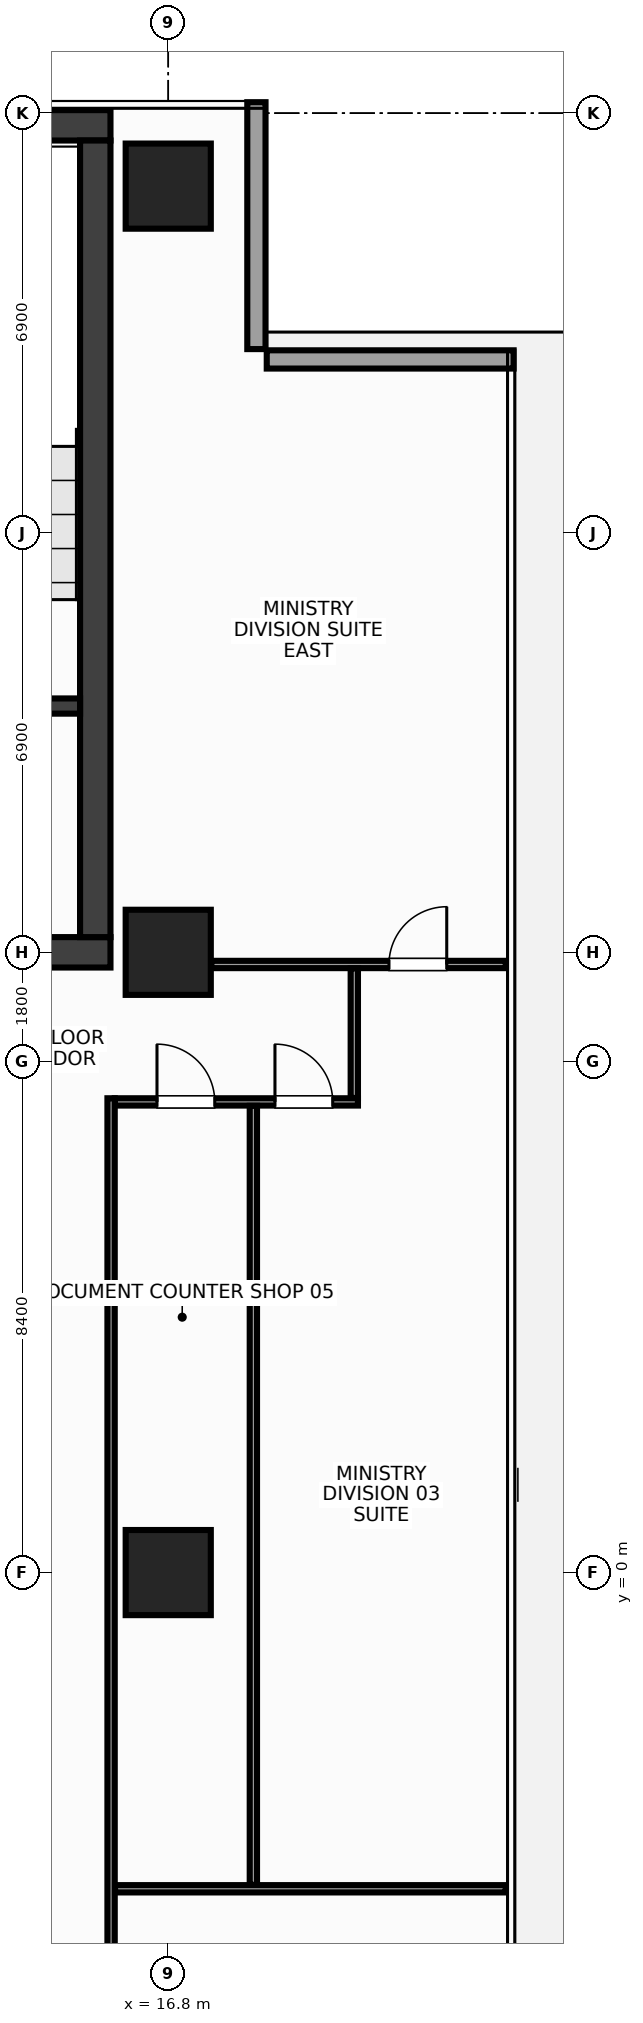
"""IFC4 building model, lengths in metres.
Left out: names, types, materials, properties, quantities, classifications, styles, units other than length and angle.
Written with IfcOpenShell. Run it as: python <this file> out.ifc"""

import sys

from ifc_helpers import new_model, si_unit, direction, frame, frame_2d, origin, origin_2d, place, context, subcontext, project, spatial, rectangle, extrude, source, transform, mapped, element, fill, save


model = new_model("IFC4")
c1 = context("Model", 3, precision=1e-05, world=origin(), true_north=direction((0.0, 1.0)))
c2 = subcontext(c1, "Body", "Model", "MODEL_VIEW")
j1 = project(units=[si_unit("LENGTHUNIT", "METRE"), si_unit("PLANEANGLEUNIT", "RADIAN")], contexts=[c1])
p1 = place(None, origin())
s1 = spatial("IfcSite", under=j1, at=p1, CompositionType="ELEMENT")
p2 = place(p1, origin())
s2 = spatial("IfcBuilding", under=s1, at=p2, CompositionType="ELEMENT")
p3 = place(p2, frame((0.0, 0.0, 228.8)))
s3 = spatial("IfcBuildingStorey", under=s2, at=p3, CompositionType="ELEMENT", Elevation=228.8)
m1 = source(origin(), c2, "Body", "SweptSolid", [
    extrude(rectangle(XDim=31.7, YDim=0.5, at=frame_2d((15.85, 0.0))), origin(), (0.0, 0.0, 1.0), 3.6),
])
p4 = place(p3, frame((-15.85, 23.8, 0.0), z_axis=(0.0, 0.0, 1.0), x_axis=(1.0, 0.0, 0.0)))
e1 = element("IfcWall", 1, at=p4, inside=s3, PredefinedType="SHEAR", context=c2, shape_type="MappedRepresentation", body=[
    mapped(m1, transform((0.0, 0.0, 0.0), x_axis=(1.0, 0.0, 0.0), y_axis=(0.0, 1.0, 0.0), z_axis=(0.0, 0.0, 1.0), scale=1.0)),
])
p5 = place(p3, frame((-15.85, 10.2, 0.0), z_axis=(0.0, 0.0, 1.0), x_axis=(1.0, 0.0, 0.0)))
e2 = element("IfcWall", 2, at=p5, inside=s3, PredefinedType="SHEAR", context=c2, shape_type="MappedRepresentation", body=[
    mapped(m1, transform((0.0, 0.0, 0.0), x_axis=(1.0, 0.0, 0.0), y_axis=(0.0, 1.0, 0.0), z_axis=(0.0, 0.0, 1.0), scale=1.0)),
])
p6 = place(p5, frame((1.7, 0.0, 0.0)))
e3 = element("IfcOpeningElement", 3, at=p6, cuts=e2, PredefinedType="OPENING", context=c2, shape_type="SweptSolid", body=[
    extrude(rectangle(XDim=1.6, YDim=2.15, at=frame_2d((0.8, 1.075))), frame((0.0, 0.262, 0.0), z_axis=(0.0, -1.0, 0.0), x_axis=(1.0, 0.0, 0.0)), (0.0, 0.0, 1.0), 0.524),
])
p7 = place(p5, frame((28.4, 0.0, 0.0)))
e4 = element("IfcOpeningElement", 4, at=p7, cuts=e2, PredefinedType="OPENING", context=c2, shape_type="SweptSolid", body=[
    extrude(rectangle(XDim=1.6, YDim=2.15, at=frame_2d((0.8, 1.075))), frame((0.0, 0.262, 0.0), z_axis=(0.0, -1.0, 0.0), x_axis=(1.0, 0.0, 0.0)), (0.0, 0.0, 1.0), 0.524),
])
p8 = place(p5, frame((15.1, 0.0, 0.0)))
e5 = element("IfcOpeningElement", 5, at=p8, cuts=e2, PredefinedType="OPENING", context=c2, shape_type="SweptSolid", body=[
    extrude(rectangle(XDim=1.5, YDim=2.2, at=frame_2d((0.75, 1.1))), frame((0.0, 0.262, 0.0), z_axis=(0.0, -1.0, 0.0), x_axis=(1.0, 0.0, 0.0)), (0.0, 0.0, 1.0), 0.524),
])
m2 = source(origin(), c2, "Body", "SweptSolid", [
    extrude(rectangle(XDim=13.1, YDim=0.5, at=frame_2d((6.55, 0.0))), origin(), (0.0, 0.0, 1.0), 3.6),
])
p9 = place(p3, frame((15.6, 10.45, 0.0), z_axis=(0.0, 0.0, 1.0), x_axis=(0.0, 1.0, 0.0)))
e6 = element("IfcWall", 6, at=p9, inside=s3, PredefinedType="SHEAR", context=c2, shape_type="MappedRepresentation", body=[
    mapped(m2, transform((0.0, 0.0, 0.0), x_axis=(1.0, 0.0, 0.0), y_axis=(0.0, 1.0, 0.0), z_axis=(0.0, 0.0, 1.0), scale=1.0)),
])
m3 = source(origin(), c2, "Body", "SweptSolid", [
    extrude(rectangle(XDim=3.705, YDim=0.25, at=frame_2d((1.853, 0.0))), origin(), (0.0, 0.0, 1.0), 3.6),
])
p10 = place(p3, frame((11.645, 14.25, 0.0), z_axis=(0.0, 0.0, 1.0), x_axis=(1.0, 0.0, 0.0)))
e7 = element("IfcWall", 7, at=p10, inside=s3, PredefinedType="SHEAR", context=c2, shape_type="MappedRepresentation", body=[
    mapped(m3, transform((0.0, 0.0, 0.0), x_axis=(1.0, 0.0, 0.0), y_axis=(0.0, 1.0, 0.0), z_axis=(0.0, 0.0, 1.0), scale=1.0)),
])
p11 = place(p10, frame((0.95, 0.0, 0.0)))
e8 = element("IfcOpeningElement", 8, at=p11, cuts=e7, PredefinedType="OPENING", context=c2, shape_type="SweptSolid", body=[
    extrude(rectangle(XDim=1.6, YDim=2.15, at=frame_2d((0.8, 1.075))), frame((0.0, 0.137, 0.0), z_axis=(0.0, -1.0, 0.0), x_axis=(1.0, 0.0, 0.0)), (0.0, 0.0, 1.0), 0.274),
])
m4 = source(origin(), c2, "Body", "SweptSolid", [
    extrude(rectangle(XDim=1.4, YDim=1.4, at=origin_2d()), origin(), (0.0, 0.0, 1.0), 3.6),
])
for number, where, z_axis, x_axis in (
    (9, (16.8, 0.0, 0.0), (0.0, 0.0, 1.0), (1.0, 0.0, 0.0)),
    (10, (16.8, 10.2, 0.0), (0.0, 0.0, 1.0), (1.0, 0.0, 0.0)),
    (11, (16.8, 22.8, 0.0), (0.0, 0.0, 1.0), (1.0, 0.0, 0.0)),
):
    element("IfcColumn", number, at=place(p3, frame(where, z_axis=z_axis, x_axis=x_axis)), inside=s3, PredefinedType="COLUMN", context=c2, shape_type="MappedRepresentation", body=[
        mapped(m4, transform((0.0, 0.0, 0.0), x_axis=(1.0, 0.0, 0.0), y_axis=(0.0, 1.0, 0.0), z_axis=(0.0, 0.0, 1.0), scale=1.0)),
    ])
m5 = source(origin(), c2, "Body", "SweptSolid", [
    extrude(rectangle(XDim=4.06, YDim=0.3, at=frame_2d((2.03, 0.0))), origin(), (0.0, 0.0, 1.0), 2.75),
])
p12 = place(p3, frame((22.48, 19.95, 0.0), z_axis=(0.0, 0.0, 1.0), x_axis=(-1.0, 0.0, 0.0)))
e12 = element("IfcWall", 12, at=p12, inside=s3, PredefinedType="STANDARD", context=c2, shape_type="MappedRepresentation", body=[
    mapped(m5, transform((0.0, 0.0, 0.0), x_axis=(1.0, 0.0, 0.0), y_axis=(0.0, 1.0, 0.0), z_axis=(0.0, 0.0, 1.0), scale=1.0)),
])
m6 = source(origin(), c2, "Body", "SweptSolid", [
    extrude(rectangle(XDim=4.06, YDim=0.3, at=frame_2d((2.03, 0.0))), origin(), (0.0, 0.0, 1.0), 2.75),
])
p13 = place(p3, frame((18.25, 20.12, 0.0), z_axis=(0.0, 0.0, 1.0), x_axis=(0.0, 1.0, 0.0)))
e13 = element("IfcWall", 13, at=p13, inside=s3, PredefinedType="STANDARD", context=c2, shape_type="MappedRepresentation", body=[
    mapped(m6, transform((0.0, 0.0, 0.0), x_axis=(1.0, 0.0, 0.0), y_axis=(0.0, 1.0, 0.0), z_axis=(0.0, 0.0, 1.0), scale=1.0)),
])
m7 = source(origin(), c2, "Body", "SweptSolid", [
    extrude(rectangle(XDim=4.84, YDim=0.12, at=frame_2d((2.42, 0.0))), origin(), (0.0, 0.0, 1.0), 3.37),
])
p14 = place(p3, frame((17.51, 10.0, 0.0), z_axis=(0.0, 0.0, 1.0), x_axis=(1.0, 0.0, 0.0)))
e14 = element("IfcWall", 14, at=p14, inside=s3, PredefinedType="PARTITIONING", context=c2, shape_type="MappedRepresentation", body=[
    mapped(m7, transform((0.0, 0.0, 0.0), x_axis=(1.0, 0.0, 0.0), y_axis=(0.0, 1.0, 0.0), z_axis=(0.0, 0.0, 1.0), scale=1.0)),
])
p15 = place(p14, frame((2.92, 0.0, 0.0)))
e15 = element("IfcOpeningElement", 15, at=p15, cuts=e14, PredefinedType="OPENING", context=c2, shape_type="SweptSolid", body=[
    extrude(rectangle(XDim=0.95, YDim=2.15, at=frame_2d((0.475, 1.075))), frame((0.0, 0.072, 0.0), z_axis=(0.0, -1.0, 0.0), x_axis=(1.0, 0.0, 0.0)), (0.0, 0.0, 1.0), 0.144),
])
m8 = source(origin(), c2, "Body", "SweptSolid", [
    extrude(rectangle(XDim=4.0, YDim=0.12, at=frame_2d((2.0, 0.0))), origin(), (0.0, 0.0, 1.0), 2.755),
])
p16 = place(p3, frame((15.92, 7.74, 0.0), z_axis=(0.0, 0.0, 1.0), x_axis=(1.0, 0.0, 0.0)))
e16 = element("IfcWall", 16, at=p16, inside=s3, PredefinedType="PARTITIONING", context=c2, shape_type="MappedRepresentation", body=[
    mapped(m8, transform((0.0, 0.0, 0.0), x_axis=(1.0, 0.0, 0.0), y_axis=(0.0, 1.0, 0.0), z_axis=(0.0, 0.0, 1.0), scale=1.0)),
])
p17 = place(p16, frame((2.635, 0.0, 0.0)))
e17 = element("IfcOpeningElement", 17, at=p17, cuts=e16, PredefinedType="OPENING", context=c2, shape_type="SweptSolid", body=[
    extrude(rectangle(XDim=0.95, YDim=2.15, at=frame_2d((0.475, 1.075))), frame((0.0, 0.072, 0.0), z_axis=(0.0, -1.0, 0.0), x_axis=(1.0, 0.0, 0.0)), (0.0, 0.0, 1.0), 0.144),
])
p18 = place(p16, frame((0.695, 0.0, 0.0)))
e18 = element("IfcOpeningElement", 18, at=p18, cuts=e16, PredefinedType="OPENING", context=c2, shape_type="SweptSolid", body=[
    extrude(rectangle(XDim=0.95, YDim=2.15, at=frame_2d((0.475, 1.075))), frame((0.0, 0.072, 0.0), z_axis=(0.0, -1.0, 0.0), x_axis=(1.0, 0.0, 0.0)), (0.0, 0.0, 1.0), 0.144),
])
m9 = source(origin(), c2, "Body", "SweptSolid", [
    extrude(rectangle(XDim=2.13, YDim=0.12, at=frame_2d((1.065, 0.0))), origin(), (0.0, 0.0, 1.0), 3.37),
])
p19 = place(p3, frame((19.86, 7.805, 0.0), z_axis=(0.0, 0.0, 1.0), x_axis=(0.0, 1.0, 0.0)))
e19 = element("IfcWall", 19, at=p19, inside=s3, PredefinedType="PARTITIONING", context=c2, shape_type="MappedRepresentation", body=[
    mapped(m9, transform((0.0, 0.0, 0.0), x_axis=(1.0, 0.0, 0.0), y_axis=(0.0, 1.0, 0.0), z_axis=(0.0, 0.0, 1.0), scale=1.0)),
])
m10 = source(origin(), c2, "Body", "SweptSolid", [
    extrude(rectangle(XDim=16.395, YDim=0.12, at=frame_2d((8.198, 0.0))), origin(), (0.0, 0.0, 1.0), 2.655),
])
p20 = place(p3, frame((15.86, -8.595, 0.0), z_axis=(0.0, 0.0, 1.0), x_axis=(0.0, 1.0, 0.0)))
e20 = element("IfcWall", 20, at=p20, inside=s3, PredefinedType="PARTITIONING", context=c2, shape_type="MappedRepresentation", body=[
    mapped(m10, transform((0.0, 0.0, 0.0), x_axis=(1.0, 0.0, 0.0), y_axis=(0.0, 1.0, 0.0), z_axis=(0.0, 0.0, 1.0), scale=1.0)),
])
m11 = source(origin(), c2, "Body", "SweptSolid", [
    extrude(rectangle(XDim=6.425, YDim=0.12, at=frame_2d((3.212, 0.0))), origin(), (0.0, 0.0, 1.0), 2.755),
])
p21 = place(p3, frame((15.925, -5.2, 0.0), z_axis=(0.0, 0.0, 1.0), x_axis=(1.0, 0.0, 0.0)))
e21 = element("IfcWall", 21, at=p21, inside=s3, PredefinedType="PARTITIONING", context=c2, shape_type="MappedRepresentation", body=[
    mapped(m11, transform((0.0, 0.0, 0.0), x_axis=(1.0, 0.0, 0.0), y_axis=(0.0, 1.0, 0.0), z_axis=(0.0, 0.0, 1.0), scale=1.0)),
])
m12 = source(origin(), c2, "Body", "SweptSolid", [
    extrude(rectangle(XDim=12.81, YDim=0.12, at=frame_2d((6.405, 0.0))), origin(), (0.0, 0.0, 1.0), 3.37),
])
p22 = place(p3, frame((18.2, -5.135, 0.0), z_axis=(0.0, 0.0, 1.0), x_axis=(0.0, 1.0, 0.0)))
e22 = element("IfcWall", 22, at=p22, inside=s3, PredefinedType="PARTITIONING", context=c2, shape_type="MappedRepresentation", body=[
    mapped(m12, transform((0.0, 0.0, 0.0), x_axis=(1.0, 0.0, 0.0), y_axis=(0.0, 1.0, 0.0), z_axis=(0.0, 0.0, 1.0), scale=1.0)),
])
m13 = source(origin(), c2, "Body", "SweptSolid", [
    extrude(rectangle(XDim=0.95, YDim=2.15, at=frame_2d((0.475, 1.075))), frame((0.0, 0.025, 0.0), z_axis=(0.0, -1.0, 0.0), x_axis=(1.0, 0.0, 0.0)), (0.0, 0.0, 1.0), 0.05),
])
p23 = place(p17, origin())
e23 = element("IfcDoor", 23, at=p23, inside=s3, OperationType="SINGLE_SWING_LEFT", PredefinedType="DOOR", context=c2, shape_type="MappedRepresentation", body=[
    mapped(m13, transform((0.0, 0.0, 0.0), x_axis=(1.0, 0.0, 0.0), y_axis=(0.0, 1.0, 0.0), z_axis=(0.0, 0.0, 1.0), scale=1.0)),
])
fill(e17, e23)
p24 = place(p18, origin())
e24 = element("IfcDoor", 24, at=p24, inside=s3, OperationType="SINGLE_SWING_LEFT", PredefinedType="DOOR", context=c2, shape_type="MappedRepresentation", body=[
    mapped(m13, transform((0.0, 0.0, 0.0), x_axis=(1.0, 0.0, 0.0), y_axis=(0.0, 1.0, 0.0), z_axis=(0.0, 0.0, 1.0), scale=1.0)),
])
fill(e18, e24)
p25 = place(p15, origin())
e25 = element("IfcDoor", 25, at=p25, inside=s3, OperationType="SINGLE_SWING_RIGHT", PredefinedType="DOOR", context=c2, shape_type="MappedRepresentation", body=[
    mapped(m13, transform((0.0, 0.0, 0.0), x_axis=(1.0, 0.0, 0.0), y_axis=(0.0, 1.0, 0.0), z_axis=(0.0, 0.0, 1.0), scale=1.0)),
])
fill(e15, e25)
save(model, sys.argv[1])
